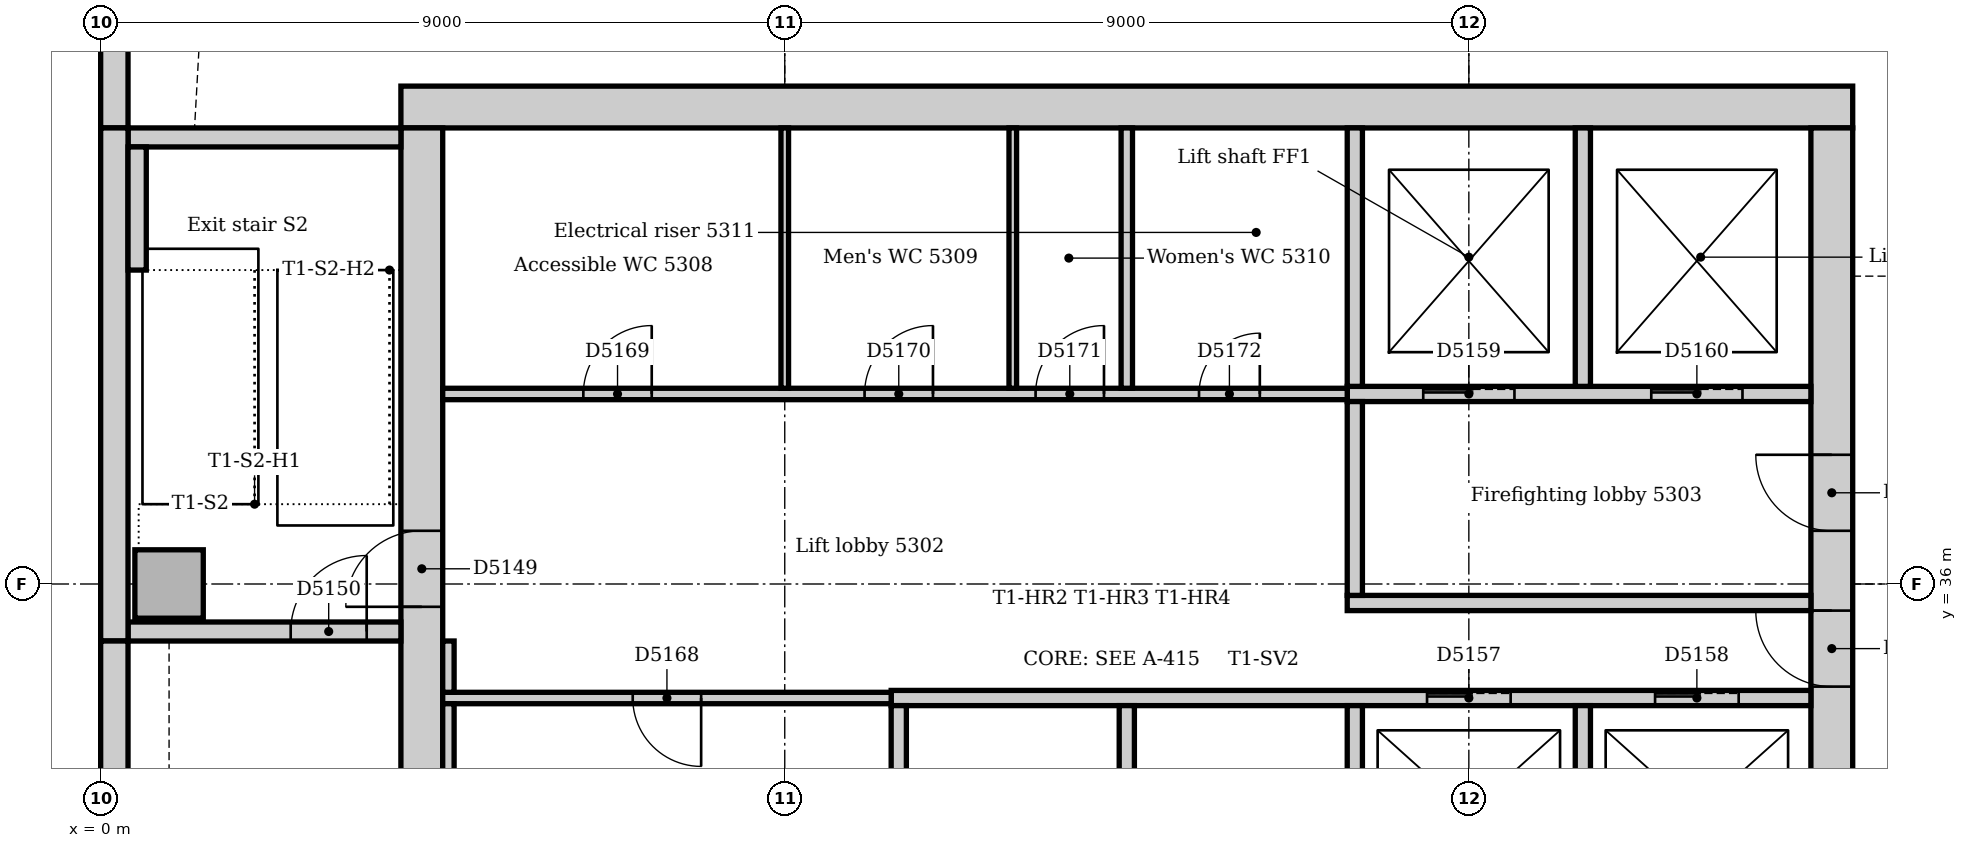
"""IFC4 building model, lengths in metres.
Left out: names, types, materials, properties, quantities, classifications, styles, units other than length and angle.
Written with IfcOpenShell. Run it as: python <this file> out.ifc"""

import sys

from ifc_helpers import new_model, si_unit, direction, frame, frame_2d, origin, origin_2d, place, context, subcontext, project, spatial, rectangle, extrude, element, fill, save


model = new_model("IFC4")
c1 = context("Model", 3, precision=1e-05, world=origin(), true_north=direction((0.0, 1.0)))
c2 = subcontext(c1, "Body", "Model", "MODEL_VIEW")
j1 = project(units=[si_unit("LENGTHUNIT", "METRE"), si_unit("PLANEANGLEUNIT", "RADIAN")], contexts=[c1])
p1 = place(None, origin())
s1 = spatial("IfcSite", under=j1, at=p1, CompositionType="ELEMENT")
p2 = place(p1, origin())
s2 = spatial("IfcBuilding", under=s1, at=p2, CompositionType="ELEMENT")
p3 = place(p2, frame((0.0, 0.0, 222.0)))
s3 = spatial("IfcBuildingStorey", under=s2, at=p3, CompositionType="ELEMENT", Elevation=222.0)
p4 = place(p3, frame((23.05, 42.275, 0.0), z_axis=(0.0, 0.0, 1.0), x_axis=(-1.0, 0.0, 0.0)))
e1 = element("IfcWall", 1, at=p4, inside=s3, PredefinedType="SOLIDWALL", context=c2, shape_type="SweptSolid", body=[
    extrude(rectangle(XDim=19.1, YDim=0.55, at=frame_2d((9.55, 0.0))), origin(), (0.0, 0.0, 1.0), 4.0),
])
p5 = place(p3, frame((22.775, 31.5, 0.0), z_axis=(0.0, 0.0, 1.0), x_axis=(0.0, 1.0, 0.0)))
e2 = element("IfcWall", 2, at=p5, inside=s3, PredefinedType="SOLIDWALL", context=c2, shape_type="SweptSolid", body=[
    extrude(rectangle(XDim=10.5, YDim=0.55, at=frame_2d((5.25, 0.0))), origin(), (0.0, 0.0, 1.0), 4.0),
])
p6 = place(p5, frame((3.15, 0.0, 0.0)))
e3 = element("IfcOpeningElement", 3, at=p6, cuts=e2, PredefinedType="OPENING", context=c2, shape_type="SweptSolid", body=[
    extrude(rectangle(XDim=1.0, YDim=2.1, at=frame_2d((0.5, 1.05))), frame((0.0, 0.285, 0.0), z_axis=(0.0, -1.0, 0.0), x_axis=(1.0, 0.0, 0.0)), (0.0, 0.0, 1.0), 0.57),
])
p7 = place(p5, frame((5.2, 0.0, 0.0)))
e4 = element("IfcOpeningElement", 4, at=p7, cuts=e2, PredefinedType="OPENING", context=c2, shape_type="SweptSolid", body=[
    extrude(rectangle(XDim=1.0, YDim=2.1, at=frame_2d((0.5, 1.05))), frame((0.0, 0.285, 0.0), z_axis=(0.0, -1.0, 0.0), x_axis=(1.0, 0.0, 0.0)), (0.0, 0.0, 1.0), 0.57),
])
p8 = place(p3, frame((4.225, 42.0, 0.0), z_axis=(0.0, 0.0, 1.0), x_axis=(0.0, -1.0, 0.0)))
e5 = element("IfcWall", 5, at=p8, inside=s3, PredefinedType="SOLIDWALL", context=c2, shape_type="SweptSolid", body=[
    extrude(rectangle(XDim=10.5, YDim=0.55, at=frame_2d((5.25, 0.0))), origin(), (0.0, 0.0, 1.0), 4.0),
])
p9 = place(p8, frame((5.3, 0.0, 0.0)))
e6 = element("IfcOpeningElement", 6, at=p9, cuts=e5, PredefinedType="OPENING", context=c2, shape_type="SweptSolid", body=[
    extrude(rectangle(XDim=1.0, YDim=2.1, at=frame_2d((0.5, 1.05))), frame((0.0, 0.285, 0.0), z_axis=(0.0, -1.0, 0.0), x_axis=(1.0, 0.0, 0.0)), (0.0, 0.0, 1.0), 0.57),
])
p10 = place(p3, frame((0.36, 35.375, 0.0), z_axis=(0.0, 0.0, 1.0), x_axis=(1.0, 0.0, 0.0)))
e7 = element("IfcWall", 7, at=p10, inside=s3, PredefinedType="SOLIDWALL", context=c2, shape_type="SweptSolid", body=[
    extrude(rectangle(XDim=3.59, YDim=0.25, at=frame_2d((1.795, 0.0))), origin(), (0.0, 0.0, 1.0), 4.0),
])
p11 = place(p10, frame((2.14, 0.0, 0.0)))
e8 = element("IfcOpeningElement", 8, at=p11, cuts=e7, PredefinedType="OPENING", context=c2, shape_type="SweptSolid", body=[
    extrude(rectangle(XDim=1.0, YDim=2.1, at=frame_2d((0.5, 1.05))), frame((0.0, 0.135, 0.0), z_axis=(0.0, -1.0, 0.0), x_axis=(1.0, 0.0, 0.0)), (0.0, 0.0, 1.0), 0.27),
])
p12 = place(p3, frame((3.95, 41.875, 0.0), z_axis=(0.0, 0.0, 1.0), x_axis=(-1.0, 0.0, 0.0)))
e9 = element("IfcWall", 9, at=p12, inside=s3, PredefinedType="SOLIDWALL", context=c2, shape_type="SweptSolid", body=[
    extrude(rectangle(XDim=3.59, YDim=0.25, at=frame_2d((1.795, 0.0))), origin(), (0.0, 0.0, 1.0), 4.0),
])
p13 = place(p3, frame((0.9, 36.0, 0.0), z_axis=(0.0, 0.0, 1.0), x_axis=(1.0, 0.0, 0.0)))
e10 = element("IfcColumn", 10, at=p13, inside=s3, PredefinedType="COLUMN", context=c2, shape_type="SweptSolid", body=[
    extrude(rectangle(XDim=0.9, YDim=0.9, at=origin_2d()), origin(), (0.0, 0.0, 1.0), 4.0),
])
p14 = place(p3, frame((0.18, 54.257, 0.0), z_axis=(0.0, 0.0, 1.0), x_axis=(0.0, -1.0, 0.0)))
e11 = element("IfcWall", 11, at=p14, inside=s3, PredefinedType="STANDARD", context=c2, shape_type="SweptSolid", body=[
    extrude(rectangle(XDim=12.257, YDim=0.36, at=frame_2d((6.129, 0.0))), origin(), (0.0, 0.0, 1.0), 3.85),
])
p15 = place(p14, frame((3.107, 0.0, 0.9)))
e12 = element("IfcOpeningElement", 12, at=p15, cuts=e11, PredefinedType="OPENING", context=c2, shape_type="SweptSolid", body=[
    extrude(rectangle(XDim=3.3, YDim=1.6, at=frame_2d((1.65, 0.8))), frame((0.0, 0.19, 0.0), z_axis=(0.0, -1.0, 0.0), x_axis=(1.0, 0.0, 0.0)), (0.0, 0.0, 1.0), 0.38),
])
p16 = place(p14, frame((7.607, 0.0, 0.9)))
e13 = element("IfcOpeningElement", 13, at=p16, cuts=e11, PredefinedType="OPENING", context=c2, shape_type="SweptSolid", body=[
    extrude(rectangle(XDim=3.3, YDim=1.6, at=frame_2d((1.65, 0.8))), frame((0.0, 0.19, 0.0), z_axis=(0.0, -1.0, 0.0), x_axis=(1.0, 0.0, 0.0)), (0.0, 0.0, 1.0), 0.38),
])
p17 = place(p3, frame((0.18, 42.0, 0.0), z_axis=(0.0, 0.0, 1.0), x_axis=(0.0, -1.0, 0.0)))
e14 = element("IfcWall", 14, at=p17, inside=s3, PredefinedType="STANDARD", context=c2, shape_type="SweptSolid", body=[
    extrude(rectangle(XDim=6.75, YDim=0.36, at=frame_2d((3.375, 0.0))), origin(), (0.0, 0.0, 1.0), 3.85),
])
p18 = place(p3, frame((0.18, 35.25, 0.0), z_axis=(0.0, 0.0, 1.0), x_axis=(0.0, -1.0, 0.0)))
e15 = element("IfcWall", 15, at=p18, inside=s3, PredefinedType="STANDARD", context=c2, shape_type="SweptSolid", body=[
    extrude(rectangle(XDim=7.5, YDim=0.36, at=frame_2d((3.75, 0.0))), origin(), (0.0, 0.0, 1.0), 3.85),
])
p19 = place(p3, frame((0.48, 40.13, 0.0), z_axis=(0.0, 0.0, 1.0), x_axis=(0.0, 1.0, 0.0)))
e16 = element("IfcWall", 16, at=p19, inside=s3, PredefinedType="STANDARD", context=c2, shape_type="SweptSolid", body=[
    extrude(rectangle(XDim=1.62, YDim=0.24, at=frame_2d((0.81, 0.0))), origin(), (0.0, 0.0, 1.0), 4.0),
])
p20 = place(p3, frame((16.4, 35.75, 0.0), z_axis=(0.0, 0.0, 1.0), x_axis=(1.0, 0.0, 0.0)))
e17 = element("IfcWall", 17, at=p20, inside=s3, PredefinedType="PARTITIONING", context=c2, shape_type="SweptSolid", body=[
    extrude(rectangle(XDim=6.1, YDim=0.2, at=frame_2d((3.05, 0.0))), origin(), (0.0, 0.0, 1.0), 3.85),
])
p21 = place(p3, frame((16.4, 38.5, 0.0), z_axis=(0.0, 0.0, 1.0), x_axis=(1.0, 0.0, 0.0)))
e18 = element("IfcWall", 18, at=p21, inside=s3, PredefinedType="PARTITIONING", context=c2, shape_type="SweptSolid", body=[
    extrude(rectangle(XDim=6.1, YDim=0.2, at=frame_2d((3.05, 0.0))), origin(), (0.0, 0.0, 1.0), 3.85),
])
p22 = place(p21, frame((1.0, 0.0, 0.0)))
e19 = element("IfcOpeningElement", 19, at=p22, cuts=e18, PredefinedType="OPENING", context=c2, shape_type="SweptSolid", body=[
    extrude(rectangle(XDim=1.2, YDim=2.1, at=frame_2d((0.6, 1.05))), frame((0.0, 0.11, 0.0), z_axis=(0.0, -1.0, 0.0), x_axis=(1.0, 0.0, 0.0)), (0.0, 0.0, 1.0), 0.22),
])
p23 = place(p21, frame((4.0, 0.0, 0.0)))
e20 = element("IfcOpeningElement", 20, at=p23, cuts=e18, PredefinedType="OPENING", context=c2, shape_type="SweptSolid", body=[
    extrude(rectangle(XDim=1.2, YDim=2.1, at=frame_2d((0.6, 1.05))), frame((0.0, 0.11, 0.0), z_axis=(0.0, -1.0, 0.0), x_axis=(1.0, 0.0, 0.0)), (0.0, 0.0, 1.0), 0.22),
])
p24 = place(p3, frame((16.5, 35.85, 0.0), z_axis=(0.0, 0.0, 1.0), x_axis=(0.0, 1.0, 0.0)))
e21 = element("IfcWall", 21, at=p24, inside=s3, PredefinedType="PARTITIONING", context=c2, shape_type="SweptSolid", body=[
    extrude(rectangle(XDim=2.55, YDim=0.2, at=frame_2d((1.275, 0.0))), origin(), (0.0, 0.0, 1.0), 3.85),
])
p25 = place(p3, frame((10.4, 34.5, 0.0), z_axis=(0.0, 0.0, 1.0), x_axis=(1.0, 0.0, 0.0)))
e22 = element("IfcWall", 22, at=p25, inside=s3, PredefinedType="PARTITIONING", context=c2, shape_type="SweptSolid", body=[
    extrude(rectangle(XDim=12.1, YDim=0.2, at=frame_2d((6.05, 0.0))), origin(), (0.0, 0.0, 1.0), 3.85),
])
p26 = place(p25, frame((7.05, 0.0, 0.0)))
e23 = element("IfcOpeningElement", 23, at=p26, cuts=e22, PredefinedType="OPENING", context=c2, shape_type="SweptSolid", body=[
    extrude(rectangle(XDim=1.1, YDim=2.1, at=frame_2d((0.55, 1.05))), frame((0.0, 0.11, 0.0), z_axis=(0.0, -1.0, 0.0), x_axis=(1.0, 0.0, 0.0)), (0.0, 0.0, 1.0), 0.22),
])
p27 = place(p25, frame((10.05, 0.0, 0.0)))
e24 = element("IfcOpeningElement", 24, at=p27, cuts=e22, PredefinedType="OPENING", context=c2, shape_type="SweptSolid", body=[
    extrude(rectangle(XDim=1.1, YDim=2.1, at=frame_2d((0.55, 1.05))), frame((0.0, 0.11, 0.0), z_axis=(0.0, -1.0, 0.0), x_axis=(1.0, 0.0, 0.0)), (0.0, 0.0, 1.0), 0.22),
])
for number, where, z_axis, x_axis in (
    (25, (10.5, 31.75, 0.0), (0.0, 0.0, 1.0), (0.0, 1.0, 0.0)),
    (26, (13.5, 31.75, 0.0), (0.0, 0.0, 1.0), (0.0, 1.0, 0.0)),
    (27, (16.5, 31.75, 0.0), (0.0, 0.0, 1.0), (0.0, 1.0, 0.0)),
    (28, (19.5, 31.75, 0.0), (0.0, 0.0, 1.0), (0.0, 1.0, 0.0)),
):
    element("IfcWall", number, at=place(p3, frame(where, z_axis=z_axis, x_axis=x_axis)), inside=s3, PredefinedType="PARTITIONING", context=c2, shape_type="SweptSolid", body=[
        extrude(rectangle(XDim=2.65, YDim=0.2, at=frame_2d((1.325, 0.0))), origin(), (0.0, 0.0, 1.0), 3.85),
    ])
for number, where, z_axis, x_axis in (
    (29, (16.5, 38.6, 0.0), (0.0, 0.0, 1.0), (0.0, 1.0, 0.0)),
    (30, (19.5, 38.6, 0.0), (0.0, 0.0, 1.0), (0.0, 1.0, 0.0)),
):
    element("IfcWall", number, at=place(p3, frame(where, z_axis=z_axis, x_axis=x_axis)), inside=s3, PredefinedType="PARTITIONING", context=c2, shape_type="SweptSolid", body=[
        extrude(rectangle(XDim=3.4, YDim=0.2, at=frame_2d((1.7, 0.0))), origin(), (0.0, 0.0, 1.0), 3.85),
    ])
p28 = place(p3, frame((4.5, 38.5, 0.0), z_axis=(0.0, 0.0, 1.0), x_axis=(1.0, 0.0, 0.0)))
e31 = element("IfcWall", 31, at=p28, inside=s3, PredefinedType="PARTITIONING", context=c2, shape_type="SweptSolid", body=[
    extrude(rectangle(XDim=11.9, YDim=0.15, at=frame_2d((5.95, 0.0))), origin(), (0.0, 0.0, 1.0), 3.85),
])
p29 = place(p28, frame((1.85, 0.0, 0.0)))
e32 = element("IfcOpeningElement", 32, at=p29, cuts=e31, PredefinedType="OPENING", context=c2, shape_type="SweptSolid", body=[
    extrude(rectangle(XDim=0.9, YDim=2.1, at=frame_2d((0.45, 1.05))), frame((0.0, 0.085, 0.0), z_axis=(0.0, -1.0, 0.0), x_axis=(1.0, 0.0, 0.0)), (0.0, 0.0, 1.0), 0.17),
])
p30 = place(p28, frame((5.55, 0.0, 0.0)))
e33 = element("IfcOpeningElement", 33, at=p30, cuts=e31, PredefinedType="OPENING", context=c2, shape_type="SweptSolid", body=[
    extrude(rectangle(XDim=0.9, YDim=2.1, at=frame_2d((0.45, 1.05))), frame((0.0, 0.085, 0.0), z_axis=(0.0, -1.0, 0.0), x_axis=(1.0, 0.0, 0.0)), (0.0, 0.0, 1.0), 0.17),
])
p31 = place(p28, frame((7.8, 0.0, 0.0)))
e34 = element("IfcOpeningElement", 34, at=p31, cuts=e31, PredefinedType="OPENING", context=c2, shape_type="SweptSolid", body=[
    extrude(rectangle(XDim=0.9, YDim=2.1, at=frame_2d((0.45, 1.05))), frame((0.0, 0.085, 0.0), z_axis=(0.0, -1.0, 0.0), x_axis=(1.0, 0.0, 0.0)), (0.0, 0.0, 1.0), 0.17),
])
p32 = place(p28, frame((9.95, 0.0, 0.0)))
e35 = element("IfcOpeningElement", 35, at=p32, cuts=e31, PredefinedType="OPENING", context=c2, shape_type="SweptSolid", body=[
    extrude(rectangle(XDim=0.8, YDim=2.1, at=frame_2d((0.4, 1.05))), frame((0.0, 0.085, 0.0), z_axis=(0.0, -1.0, 0.0), x_axis=(1.0, 0.0, 0.0)), (0.0, 0.0, 1.0), 0.17),
])
p33 = place(p3, frame((4.5, 34.5, 0.0), z_axis=(0.0, 0.0, 1.0), x_axis=(1.0, 0.0, 0.0)))
e36 = element("IfcWall", 36, at=p33, inside=s3, PredefinedType="PARTITIONING", context=c2, shape_type="SweptSolid", body=[
    extrude(rectangle(XDim=5.9, YDim=0.15, at=frame_2d((2.95, 0.0))), origin(), (0.0, 0.0, 1.0), 3.85),
])
p34 = place(p33, frame((2.5, 0.0, 0.0)))
e37 = element("IfcOpeningElement", 37, at=p34, cuts=e36, PredefinedType="OPENING", context=c2, shape_type="SweptSolid", body=[
    extrude(rectangle(XDim=0.9, YDim=2.1, at=frame_2d((0.45, 1.05))), frame((0.0, 0.085, 0.0), z_axis=(0.0, -1.0, 0.0), x_axis=(1.0, 0.0, 0.0)), (0.0, 0.0, 1.0), 0.17),
])
p35 = place(p3, frame((4.575, 34.575, 0.0), z_axis=(0.0, 0.0, 1.0), x_axis=(0.0, 1.0, 0.0)))
e38 = element("IfcWall", 38, at=p35, inside=s3, PredefinedType="PARTITIONING", context=c2, shape_type="SweptSolid", body=[
    extrude(rectangle(XDim=0.675, YDim=0.15, at=frame_2d((0.338, 0.0))), origin(), (0.0, 0.0, 1.0), 3.85),
])
p36 = place(p3, frame((4.575, 31.75, 0.0), z_axis=(0.0, 0.0, 1.0), x_axis=(0.0, 1.0, 0.0)))
e39 = element("IfcWall", 39, at=p36, inside=s3, PredefinedType="PARTITIONING", context=c2, shape_type="SweptSolid", body=[
    extrude(rectangle(XDim=2.675, YDim=0.15, at=frame_2d((1.337, 0.0))), origin(), (0.0, 0.0, 1.0), 3.85),
])
p37 = place(p3, frame((13.5, 38.575, 0.0), z_axis=(0.0, 0.0, 1.0), x_axis=(0.0, 1.0, 0.0)))
e40 = element("IfcWall", 40, at=p37, inside=s3, PredefinedType="PARTITIONING", context=c2, shape_type="SweptSolid", body=[
    extrude(rectangle(XDim=3.425, YDim=0.15, at=frame_2d((1.712, 0.0))), origin(), (0.0, 0.0, 1.0), 3.85),
])
for number, where, z_axis, x_axis in (
    (41, (9.0, 38.575, 0.0), (0.0, 0.0, 1.0), (0.0, 1.0, 0.0)),
    (42, (12.0, 38.575, 0.0), (0.0, 0.0, 1.0), (0.0, 1.0, 0.0)),
):
    element("IfcWall", number, at=place(p3, frame(where, z_axis=z_axis, x_axis=x_axis)), inside=s3, PredefinedType="PARTITIONING", context=c2, shape_type="SweptSolid", body=[
        extrude(rectangle(XDim=3.425, YDim=0.1, at=frame_2d((1.712, 0.0))), origin(), (0.0, 0.0, 1.0), 3.85),
    ])
p38 = place(p9, frame((1.0, 0.0, 0.0), z_axis=(0.0, 0.0, 1.0), x_axis=(-1.0, 0.0, 0.0)))
e43 = element("IfcDoor", 43, at=p38, inside=s3, OperationType="SINGLE_SWING_LEFT", PredefinedType="DOOR", context=c2, shape_type="SweptSolid", body=[
    extrude(rectangle(XDim=1.0, YDim=2.1, at=frame_2d((0.5, 1.05))), frame((0.0, 0.025, 0.0), z_axis=(0.0, -1.0, 0.0), x_axis=(1.0, 0.0, 0.0)), (0.0, 0.0, 1.0), 0.05),
])
fill(e6, e43)
p39 = place(p11, origin())
e44 = element("IfcDoor", 44, at=p39, inside=s3, OperationType="SINGLE_SWING_RIGHT", PredefinedType="DOOR", context=c2, shape_type="SweptSolid", body=[
    extrude(rectangle(XDim=1.0, YDim=2.1, at=frame_2d((0.5, 1.05))), frame((0.0, 0.025, 0.0), z_axis=(0.0, -1.0, 0.0), x_axis=(1.0, 0.0, 0.0)), (0.0, 0.0, 1.0), 0.05),
])
fill(e8, e44)
p40 = place(p26, origin())
e45 = element("IfcDoor", 45, at=p40, inside=s3, OperationType="SLIDING_TO_LEFT", PredefinedType="DOOR", context=c2, shape_type="SweptSolid", body=[
    extrude(rectangle(XDim=1.1, YDim=2.1, at=frame_2d((0.55, 1.05))), frame((0.0, 0.025, 0.0), z_axis=(0.0, -1.0, 0.0), x_axis=(1.0, 0.0, 0.0)), (0.0, 0.0, 1.0), 0.05),
])
fill(e23, e45)
p41 = place(p27, origin())
e46 = element("IfcDoor", 46, at=p41, inside=s3, OperationType="SLIDING_TO_LEFT", PredefinedType="DOOR", context=c2, shape_type="SweptSolid", body=[
    extrude(rectangle(XDim=1.1, YDim=2.1, at=frame_2d((0.55, 1.05))), frame((0.0, 0.025, 0.0), z_axis=(0.0, -1.0, 0.0), x_axis=(1.0, 0.0, 0.0)), (0.0, 0.0, 1.0), 0.05),
])
fill(e24, e46)
p42 = place(p22, origin())
e47 = element("IfcDoor", 47, at=p42, inside=s3, OperationType="SLIDING_TO_LEFT", PredefinedType="DOOR", context=c2, shape_type="SweptSolid", body=[
    extrude(rectangle(XDim=1.2, YDim=2.1, at=frame_2d((0.6, 1.05))), frame((0.0, 0.025, 0.0), z_axis=(0.0, -1.0, 0.0), x_axis=(1.0, 0.0, 0.0)), (0.0, 0.0, 1.0), 0.05),
])
fill(e19, e47)
p43 = place(p23, origin())
e48 = element("IfcDoor", 48, at=p43, inside=s3, OperationType="SLIDING_TO_LEFT", PredefinedType="DOOR", context=c2, shape_type="SweptSolid", body=[
    extrude(rectangle(XDim=1.2, YDim=2.1, at=frame_2d((0.6, 1.05))), frame((0.0, 0.025, 0.0), z_axis=(0.0, -1.0, 0.0), x_axis=(1.0, 0.0, 0.0)), (0.0, 0.0, 1.0), 0.05),
])
fill(e20, e48)
p44 = place(p6, origin())
e49 = element("IfcDoor", 49, at=p44, inside=s3, OperationType="SINGLE_SWING_RIGHT", PredefinedType="DOOR", context=c2, shape_type="SweptSolid", body=[
    extrude(rectangle(XDim=1.0, YDim=2.1, at=frame_2d((0.5, 1.05))), frame((0.0, 0.025, 0.0), z_axis=(0.0, -1.0, 0.0), x_axis=(1.0, 0.0, 0.0)), (0.0, 0.0, 1.0), 0.05),
])
fill(e3, e49)
p45 = place(p7, origin())
e50 = element("IfcDoor", 50, at=p45, inside=s3, OperationType="SINGLE_SWING_RIGHT", PredefinedType="DOOR", context=c2, shape_type="SweptSolid", body=[
    extrude(rectangle(XDim=1.0, YDim=2.1, at=frame_2d((0.5, 1.05))), frame((0.0, 0.025, 0.0), z_axis=(0.0, -1.0, 0.0), x_axis=(1.0, 0.0, 0.0)), (0.0, 0.0, 1.0), 0.05),
])
fill(e4, e50)
p46 = place(p34, frame((0.9, 0.0, 0.0), z_axis=(0.0, 0.0, 1.0), x_axis=(-1.0, 0.0, 0.0)))
e51 = element("IfcDoor", 51, at=p46, inside=s3, OperationType="SINGLE_SWING_LEFT", PredefinedType="DOOR", context=c2, shape_type="SweptSolid", body=[
    extrude(rectangle(XDim=0.9, YDim=2.1, at=frame_2d((0.45, 1.05))), frame((0.0, 0.025, 0.0), z_axis=(0.0, -1.0, 0.0), x_axis=(1.0, 0.0, 0.0)), (0.0, 0.0, 1.0), 0.05),
])
fill(e37, e51)
p47 = place(p29, origin())
e52 = element("IfcDoor", 52, at=p47, inside=s3, OperationType="SINGLE_SWING_RIGHT", PredefinedType="DOOR", context=c2, shape_type="SweptSolid", body=[
    extrude(rectangle(XDim=0.9, YDim=2.1, at=frame_2d((0.45, 1.05))), frame((0.0, 0.025, 0.0), z_axis=(0.0, -1.0, 0.0), x_axis=(1.0, 0.0, 0.0)), (0.0, 0.0, 1.0), 0.05),
])
fill(e32, e52)
p48 = place(p30, origin())
e53 = element("IfcDoor", 53, at=p48, inside=s3, OperationType="SINGLE_SWING_RIGHT", PredefinedType="DOOR", context=c2, shape_type="SweptSolid", body=[
    extrude(rectangle(XDim=0.9, YDim=2.1, at=frame_2d((0.45, 1.05))), frame((0.0, 0.025, 0.0), z_axis=(0.0, -1.0, 0.0), x_axis=(1.0, 0.0, 0.0)), (0.0, 0.0, 1.0), 0.05),
])
fill(e33, e53)
p49 = place(p31, origin())
e54 = element("IfcDoor", 54, at=p49, inside=s3, OperationType="SINGLE_SWING_RIGHT", PredefinedType="DOOR", context=c2, shape_type="SweptSolid", body=[
    extrude(rectangle(XDim=0.9, YDim=2.1, at=frame_2d((0.45, 1.05))), frame((0.0, 0.025, 0.0), z_axis=(0.0, -1.0, 0.0), x_axis=(1.0, 0.0, 0.0)), (0.0, 0.0, 1.0), 0.05),
])
fill(e34, e54)
p50 = place(p32, origin())
e55 = element("IfcDoor", 55, at=p50, inside=s3, OperationType="SINGLE_SWING_RIGHT", PredefinedType="DOOR", context=c2, shape_type="SweptSolid", body=[
    extrude(rectangle(XDim=0.8, YDim=2.1, at=frame_2d((0.4, 1.05))), frame((0.0, 0.025, 0.0), z_axis=(0.0, -1.0, 0.0), x_axis=(1.0, 0.0, 0.0)), (0.0, 0.0, 1.0), 0.05),
])
fill(e35, e55)
save(model, sys.argv[1])
